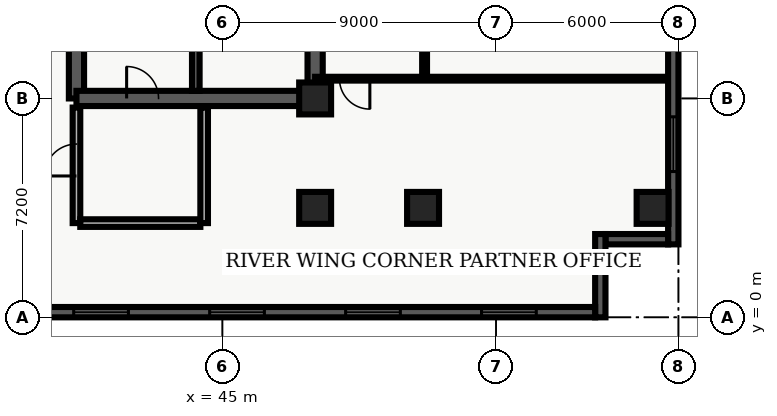
"""IFC4 building model, lengths in metres.
Left out: names, types, materials, properties, quantities, classifications, styles, units other than length and angle.
Written with IfcOpenShell. Run it as: python <this file> out.ifc"""

import sys

from ifc_helpers import new_model, entity, si_unit, converted_unit, direction, frame, origin_with_axes, origin_2d_with_axis, place, context, subcontext, project, spatial, polyline, rectangle, outline, extrude, element, fill, save


model = new_model("IFC4")
c1 = context("Model", 3, precision=1e-05, world=origin_with_axes(), true_north=direction((0.0, 1.0)))
c2 = subcontext(c1, "Body", "Model", "MODEL_VIEW")
j1 = project(units=[si_unit("LENGTHUNIT", "METRE"), converted_unit("PLANEANGLEUNIT", "DEGREE", entity("IfcPlaneAngleMeasure", 0.017), si_unit("PLANEANGLEUNIT", "RADIAN"), dimensions=[0, 0, 0, 0, 0, 0, 0])], contexts=[c1])
p1 = place(None, origin_with_axes())
s1 = spatial("IfcSite", under=j1, at=p1, CompositionType="ELEMENT")
p2 = place(p1, origin_with_axes())
s2 = spatial("IfcBuilding", under=s1, at=p2, CompositionType="ELEMENT")
p3 = place(p2, frame((0.0, 0.0, 148.5), z_axis=(0.0, 0.0, 1.0), x_axis=(1.0, 0.0, 0.0)))
s3 = spatial("IfcBuildingStorey", under=s2, at=p3, CompositionType="ELEMENT", Elevation=148.5)
p4 = place(p3, frame((40.2, 7.2, 0.0), z_axis=(0.0, 0.0, 1.0), x_axis=(0.0, 1.0, 0.0)))
e1 = element("IfcWall", 1, at=p4, inside=s3, PredefinedType="SHEAR", context=c2, shape_type="SweptSolid", body=[
    extrude(outline(polyline([(0.0, -0.25), (15.6, -0.25), (15.6, 0.25), (0.0, 0.25), (0.0, -0.25)])), origin_with_axes(), (0.0, 0.0, 1.0), 3.66),
])
p5 = place(p4, frame((14.475, 0.0, 0.0), z_axis=(0.0, 0.0, 1.0), x_axis=(1.0, 0.0, 0.0)))
e2 = element("IfcOpeningElement", 2, at=p5, cuts=e1, PredefinedType="OPENING", context=c2, shape_type="SweptSolid", body=[
    extrude(rectangle(XDim=1.05, YDim=0.52, at=origin_2d_with_axis()), origin_with_axes(), (0.0, 0.0, 1.0), 2.15),
])
p6 = place(p4, frame((12.75, 0.0, 0.0), z_axis=(0.0, 0.0, 1.0), x_axis=(1.0, 0.0, 0.0)))
e3 = element("IfcOpeningElement", 3, at=p6, cuts=e1, PredefinedType="OPENING", context=c2, shape_type="SweptSolid", body=[
    extrude(rectangle(XDim=1.2, YDim=0.52, at=origin_2d_with_axis()), origin_with_axes(), (0.0, 0.0, 1.0), 2.15),
])
p7 = place(p4, frame((9.3, 0.0, 0.0), z_axis=(0.0, 0.0, 1.0), x_axis=(1.0, 0.0, 0.0)))
e4 = element("IfcOpeningElement", 4, at=p7, cuts=e1, PredefinedType="OPENING", context=c2, shape_type="SweptSolid", body=[
    extrude(rectangle(XDim=0.9, YDim=0.52, at=origin_2d_with_axis()), origin_with_axes(), (0.0, 0.0, 1.0), 2.15),
])
p8 = place(p3, frame((40.2, 7.2, 0.0), z_axis=(0.0, 0.0, 1.0), x_axis=(1.0, 0.0, 0.0)))
e5 = element("IfcWall", 5, at=p8, inside=s3, PredefinedType="SHEAR", context=c2, shape_type="SweptSolid", body=[
    extrude(outline(polyline([(0.0, -0.25), (7.85, -0.25), (7.85, 0.25), (0.0, 0.25), (0.0, -0.25)])), origin_with_axes(), (0.0, 0.0, 1.0), 3.66),
])
p9 = place(p8, frame((2.175, 0.0, 0.0), z_axis=(0.0, 0.0, 1.0), x_axis=(1.0, 0.0, 0.0)))
e6 = element("IfcOpeningElement", 6, at=p9, cuts=e5, PredefinedType="OPENING", context=c2, shape_type="SweptSolid", body=[
    extrude(rectangle(XDim=1.05, YDim=0.52, at=origin_2d_with_axis()), origin_with_axes(), (0.0, 0.0, 1.0), 2.15),
])
p10 = place(p3, frame((48.05, 7.2, 0.0), z_axis=(0.0, 0.0, 1.0), x_axis=(0.0, 1.0, 0.0)))
e7 = element("IfcWall", 7, at=p10, inside=s3, PredefinedType="SHEAR", context=c2, shape_type="SweptSolid", body=[
    extrude(outline(polyline([(0.0, -0.25), (15.6, -0.25), (15.6, 0.25), (0.0, 0.25), (0.0, -0.25)])), origin_with_axes(), (0.0, 0.0, 1.0), 3.66),
])
p11 = place(p10, frame((5.975, 0.0, 0.0), z_axis=(0.0, 0.0, 1.0), x_axis=(1.0, 0.0, 0.0)))
e8 = element("IfcOpeningElement", 8, at=p11, cuts=e7, PredefinedType="OPENING", context=c2, shape_type="SweptSolid", body=[
    extrude(rectangle(XDim=1.05, YDim=0.52, at=origin_2d_with_axis()), origin_with_axes(), (0.0, 0.0, 1.0), 2.15),
])
p12 = place(p10, frame((2.725, 0.0, 0.0), z_axis=(0.0, 0.0, 1.0), x_axis=(1.0, 0.0, 0.0)))
e9 = element("IfcOpeningElement", 9, at=p12, cuts=e7, PredefinedType="OPENING", context=c2, shape_type="SweptSolid", body=[
    extrude(rectangle(XDim=0.95, YDim=0.52, at=origin_2d_with_axis()), origin_with_axes(), (0.0, 0.0, 1.0), 2.15),
])
p13 = place(p3, frame((44.125, 7.45, 0.0), z_axis=(0.0, 0.0, 1.0), x_axis=(0.0, 1.0, 0.0)))
e10 = element("IfcWall", 10, at=p13, inside=s3, PredefinedType="SHEAR", context=c2, shape_type="SweptSolid", body=[
    extrude(outline(polyline([(0.0, -0.125), (15.1, -0.125), (15.1, 0.125), (0.0, 0.125), (0.0, -0.125)])), origin_with_axes(), (0.0, 0.0, 1.0), 3.66),
])
p14 = place(p3, frame((40.2, 3.1, 0.0), z_axis=(0.0, 0.0, 1.0), x_axis=(0.0, 1.0, 0.0)))
e11 = element("IfcWall", 11, at=p14, inside=s3, PredefinedType="SOLIDWALL", context=c2, shape_type="SweptSolid", body=[
    extrude(outline(polyline([(0.0, -0.125), (3.8, -0.125), (3.8, 0.125), (0.0, 0.125), (0.0, -0.125)])), origin_with_axes(), (0.0, 0.0, 1.0), 2.7),
])
p15 = place(p14, frame((2.075, 0.0, 0.0), z_axis=(0.0, 0.0, 1.0), x_axis=(1.0, 0.0, 0.0)))
e12 = element("IfcOpeningElement", 12, at=p15, cuts=e11, PredefinedType="OPENING", context=c2, shape_type="SweptSolid", body=[
    extrude(rectangle(XDim=1.05, YDim=0.27, at=origin_2d_with_axis()), origin_with_axes(), (0.0, 0.0, 1.0), 2.15),
])
p16 = place(p3, frame((40.325, 3.1, 0.0), z_axis=(0.0, 0.0, 1.0), x_axis=(1.0, 0.0, 0.0)))
e13 = element("IfcWall", 13, at=p16, inside=s3, PredefinedType="SOLIDWALL", context=c2, shape_type="SweptSolid", body=[
    extrude(outline(polyline([(0.0, -0.125), (3.95, -0.125), (3.95, 0.125), (0.0, 0.125), (0.0, -0.125)])), origin_with_axes(), (0.0, 0.0, 1.0), 2.7),
])
p17 = place(p3, frame((44.4, 3.1, 0.0), z_axis=(0.0, 0.0, 1.0), x_axis=(0.0, 1.0, 0.0)))
e14 = element("IfcWall", 14, at=p17, inside=s3, PredefinedType="SOLIDWALL", context=c2, shape_type="SweptSolid", body=[
    extrude(outline(polyline([(0.0, -0.125), (3.8, -0.125), (3.8, 0.125), (0.0, 0.125), (0.0, -0.125)])), origin_with_axes(), (0.0, 0.0, 1.0), 2.7),
])
for number, where, z_axis, x_axis in (
    (15, (48.05, 3.6, 0.0), (0.0, 0.0, 1.0), (1.0, 0.0, 0.0)),
    (16, (48.05, 7.2, 0.0), (0.0, 0.0, 1.0), (1.0, 0.0, 0.0)),
    (17, (51.6, 3.6, 0.0), (0.0, 0.0, 1.0), (1.0, 0.0, 0.0)),
    (18, (59.15, 3.6, 0.0), (0.0, 0.0, 1.0), (1.0, 0.0, 0.0)),
):
    element("IfcColumn", number, at=place(p3, frame(where, z_axis=z_axis, x_axis=x_axis)), inside=s3, PredefinedType="COLUMN", context=c2, shape_type="SweptSolid", body=[
        extrude(rectangle(XDim=1.05, YDim=1.05, at=origin_2d_with_axis()), origin_with_axes(), (0.0, 0.0, 1.0), 3.9),
    ])
p18 = place(p3, frame((51.65, 7.85, 0.0), z_axis=(0.0, 0.0, 1.0), x_axis=(0.0, 1.0, 0.0)))
e19 = element("IfcWall", 19, at=p18, inside=s3, PredefinedType="PARTITIONING", context=c2, shape_type="SweptSolid", body=[
    extrude(outline(polyline([(0.0, -0.08), (18.8, -0.08), (18.8, 0.08), (0.0, 0.08), (0.0, -0.08)])), origin_with_axes(), (0.0, 0.0, 1.0), 2.7),
])
p19 = place(p18, frame((4.559, 0.0, 0.0), z_axis=(0.0, 0.0, 1.0), x_axis=(1.0, 0.0, 0.0)))
e20 = element("IfcOpeningElement", 20, at=p19, cuts=e19, PredefinedType="OPENING", context=c2, shape_type="SweptSolid", body=[
    extrude(rectangle(XDim=1.0, YDim=0.18, at=origin_2d_with_axis()), origin_with_axes(), (0.0, 0.0, 1.0), 2.15),
])
p20 = place(p18, frame((11.523, 0.0, 0.0), z_axis=(0.0, 0.0, 1.0), x_axis=(1.0, 0.0, 0.0)))
e21 = element("IfcOpeningElement", 21, at=p20, cuts=e19, PredefinedType="OPENING", context=c2, shape_type="SweptSolid", body=[
    extrude(rectangle(XDim=1.0, YDim=0.18, at=origin_2d_with_axis()), origin_with_axes(), (0.0, 0.0, 1.0), 2.15),
])
p21 = place(p18, frame((17.733, 0.0, 0.0), z_axis=(0.0, 0.0, 1.0), x_axis=(1.0, 0.0, 0.0)))
e22 = element("IfcOpeningElement", 22, at=p21, cuts=e19, PredefinedType="OPENING", context=c2, shape_type="SweptSolid", body=[
    extrude(rectangle(XDim=1.0, YDim=0.18, at=origin_2d_with_axis()), origin_with_axes(), (0.0, 0.0, 1.0), 2.15),
])
p22 = place(p3, frame((59.665, 7.85, 0.0), z_axis=(0.0, 0.0, 1.0), x_axis=(-1.0, 0.0, 0.0)))
e23 = element("IfcWall", 23, at=p22, inside=s3, PredefinedType="PARTITIONING", context=c2, shape_type="SweptSolid", body=[
    extrude(outline(polyline([(0.0, -0.062), (11.615, -0.062), (11.615, 0.062), (0.0, 0.062), (0.0, -0.062)])), origin_with_axes(), (0.0, 0.0, 1.0), 2.7),
])
p23 = place(p22, frame((10.315, 0.0, 0.0), z_axis=(0.0, 0.0, 1.0), x_axis=(1.0, 0.0, 0.0)))
e24 = element("IfcOpeningElement", 24, at=p23, cuts=e23, PredefinedType="OPENING", context=c2, shape_type="SweptSolid", body=[
    extrude(rectangle(XDim=1.0, YDim=0.145, at=origin_2d_with_axis()), origin_with_axes(), (0.0, 0.0, 1.0), 2.15),
])
p24 = place(p3, frame((59.83, 26.06, 0.0), z_axis=(0.0, 0.0, 1.0), x_axis=(0.0, -1.0, 0.0)))
e25 = element("IfcWall", 25, at=p24, inside=s3, PredefinedType="SOLIDWALL", context=c2, shape_type="SweptSolid", body=[
    extrude(outline(polyline([(0.0, -0.17), (23.66, -0.17), (23.66, 0.17), (0.0, 0.17), (0.0, -0.17)])), origin_with_axes(), (0.0, 0.0, 1.0), 3.66),
])
p25 = place(p24, frame((11.83, 0.0, 0.45), z_axis=(0.0, 0.0, 1.0), x_axis=(1.0, 0.0, 0.0)))
e26 = element("IfcOpeningElement", 26, at=p25, cuts=e25, PredefinedType="OPENING", context=c2, shape_type="SweptSolid", body=[
    extrude(rectangle(XDim=1.8, YDim=0.36, at=origin_2d_with_axis()), origin_with_axes(), (0.0, 0.0, 1.0), 2.1),
])
p26 = place(p24, frame((20.364, 0.0, 0.45), z_axis=(0.0, 0.0, 1.0), x_axis=(1.0, 0.0, 0.0)))
e27 = element("IfcOpeningElement", 27, at=p26, cuts=e25, PredefinedType="OPENING", context=c2, shape_type="SweptSolid", body=[
    extrude(rectangle(XDim=1.8, YDim=0.36, at=origin_2d_with_axis()), origin_with_axes(), (0.0, 0.0, 1.0), 2.1),
])
p27 = place(p3, frame((59.66, 2.57, 0.0), z_axis=(0.0, 0.0, 1.0), x_axis=(-1.0, 0.0, 0.0)))
e28 = element("IfcWall", 28, at=p27, inside=s3, PredefinedType="SOLIDWALL", context=c2, shape_type="SweptSolid", body=[
    extrude(outline(polyline([(0.0, -0.17), (2.06, -0.17), (2.06, 0.17), (0.0, 0.17), (0.0, -0.17)])), origin_with_axes(), (0.0, 0.0, 1.0), 3.66),
])
p28 = place(p3, frame((57.43, 2.74, 0.0), z_axis=(0.0, 0.0, 1.0), x_axis=(0.0, -1.0, 0.0)))
e29 = element("IfcWall", 29, at=p28, inside=s3, PredefinedType="SOLIDWALL", context=c2, shape_type="SweptSolid", body=[
    extrude(outline(polyline([(0.0, -0.17), (2.74, -0.17), (2.74, 0.17), (0.0, 0.17), (0.0, -0.17)])), origin_with_axes(), (0.0, 0.0, 1.0), 3.66),
])
p29 = place(p3, frame((57.26, 0.17, 0.0), z_axis=(0.0, 0.0, 1.0), x_axis=(-1.0, 0.0, 0.0)))
e30 = element("IfcWall", 30, at=p29, inside=s3, PredefinedType="SOLIDWALL", context=c2, shape_type="SweptSolid", body=[
    extrude(outline(polyline([(0.0, -0.17), (54.86, -0.17), (54.86, 0.17), (0.0, 0.17), (0.0, -0.17)])), origin_with_axes(), (0.0, 0.0, 1.0), 3.66),
])
p30 = place(p29, frame((2.836, 0.0, 0.45), z_axis=(0.0, 0.0, 1.0), x_axis=(1.0, 0.0, 0.0)))
e31 = element("IfcOpeningElement", 31, at=p30, cuts=e30, PredefinedType="OPENING", context=c2, shape_type="SweptSolid", body=[
    extrude(rectangle(XDim=1.8, YDim=0.36, at=origin_2d_with_axis()), origin_with_axes(), (0.0, 0.0, 1.0), 2.1),
])
p31 = place(p29, frame((7.307, 0.0, 0.45), z_axis=(0.0, 0.0, 1.0), x_axis=(1.0, 0.0, 0.0)))
e32 = element("IfcOpeningElement", 32, at=p31, cuts=e30, PredefinedType="OPENING", context=c2, shape_type="SweptSolid", body=[
    extrude(rectangle(XDim=1.8, YDim=0.36, at=origin_2d_with_axis()), origin_with_axes(), (0.0, 0.0, 1.0), 2.1),
])
p32 = place(p29, frame((11.779, 0.0, 0.45), z_axis=(0.0, 0.0, 1.0), x_axis=(1.0, 0.0, 0.0)))
e33 = element("IfcOpeningElement", 33, at=p32, cuts=e30, PredefinedType="OPENING", context=c2, shape_type="SweptSolid", body=[
    extrude(rectangle(XDim=1.8, YDim=0.36, at=origin_2d_with_axis()), origin_with_axes(), (0.0, 0.0, 1.0), 2.1),
])
p33 = place(p29, frame((16.251, 0.0, 0.45), z_axis=(0.0, 0.0, 1.0), x_axis=(1.0, 0.0, 0.0)))
e34 = element("IfcOpeningElement", 34, at=p33, cuts=e30, PredefinedType="OPENING", context=c2, shape_type="SweptSolid", body=[
    extrude(rectangle(XDim=1.8, YDim=0.36, at=origin_2d_with_axis()), origin_with_axes(), (0.0, 0.0, 1.0), 2.1),
])
p34 = place(p29, frame((20.723, 0.0, 0.45), z_axis=(0.0, 0.0, 1.0), x_axis=(1.0, 0.0, 0.0)))
e35 = element("IfcOpeningElement", 35, at=p34, cuts=e30, PredefinedType="OPENING", context=c2, shape_type="SweptSolid", body=[
    extrude(rectangle(XDim=1.8, YDim=0.36, at=origin_2d_with_axis()), origin_with_axes(), (0.0, 0.0, 1.0), 2.1),
])
p35 = place(p29, frame((25.194, 0.0, 0.45), z_axis=(0.0, 0.0, 1.0), x_axis=(1.0, 0.0, 0.0)))
e36 = element("IfcOpeningElement", 36, at=p35, cuts=e30, PredefinedType="OPENING", context=c2, shape_type="SweptSolid", body=[
    extrude(rectangle(XDim=1.8, YDim=0.36, at=origin_2d_with_axis()), origin_with_axes(), (0.0, 0.0, 1.0), 2.1),
])
p36 = place(p29, frame((29.666, 0.0, 0.45), z_axis=(0.0, 0.0, 1.0), x_axis=(1.0, 0.0, 0.0)))
e37 = element("IfcOpeningElement", 37, at=p36, cuts=e30, PredefinedType="OPENING", context=c2, shape_type="SweptSolid", body=[
    extrude(rectangle(XDim=1.8, YDim=0.36, at=origin_2d_with_axis()), origin_with_axes(), (0.0, 0.0, 1.0), 2.1),
])
p37 = place(p29, frame((34.138, 0.0, 0.45), z_axis=(0.0, 0.0, 1.0), x_axis=(1.0, 0.0, 0.0)))
e38 = element("IfcOpeningElement", 38, at=p37, cuts=e30, PredefinedType="OPENING", context=c2, shape_type="SweptSolid", body=[
    extrude(rectangle(XDim=1.8, YDim=0.36, at=origin_2d_with_axis()), origin_with_axes(), (0.0, 0.0, 1.0), 2.1),
])
p38 = place(p29, frame((38.609, 0.0, 0.45), z_axis=(0.0, 0.0, 1.0), x_axis=(1.0, 0.0, 0.0)))
e39 = element("IfcOpeningElement", 39, at=p38, cuts=e30, PredefinedType="OPENING", context=c2, shape_type="SweptSolid", body=[
    extrude(rectangle(XDim=1.8, YDim=0.36, at=origin_2d_with_axis()), origin_with_axes(), (0.0, 0.0, 1.0), 2.1),
])
p39 = place(p29, frame((43.081, 0.0, 0.45), z_axis=(0.0, 0.0, 1.0), x_axis=(1.0, 0.0, 0.0)))
e40 = element("IfcOpeningElement", 40, at=p39, cuts=e30, PredefinedType="OPENING", context=c2, shape_type="SweptSolid", body=[
    extrude(rectangle(XDim=1.8, YDim=0.36, at=origin_2d_with_axis()), origin_with_axes(), (0.0, 0.0, 1.0), 2.1),
])
p40 = place(p29, frame((48.403, 0.0, 0.45), z_axis=(0.0, 0.0, 1.0), x_axis=(1.0, 0.0, 0.0)))
e41 = element("IfcOpeningElement", 41, at=p40, cuts=e30, PredefinedType="OPENING", context=c2, shape_type="SweptSolid", body=[
    extrude(rectangle(XDim=1.8, YDim=0.36, at=origin_2d_with_axis()), origin_with_axes(), (0.0, 0.0, 1.0), 2.1),
])
p41 = place(p29, frame((52.024, 0.0, 0.45), z_axis=(0.0, 0.0, 1.0), x_axis=(1.0, 0.0, 0.0)))
e42 = element("IfcOpeningElement", 42, at=p41, cuts=e30, PredefinedType="OPENING", context=c2, shape_type="SweptSolid", body=[
    extrude(rectangle(XDim=1.8, YDim=0.36, at=origin_2d_with_axis()), origin_with_axes(), (0.0, 0.0, 1.0), 2.1),
])
p42 = place(p8, frame((2.175, 0.0, 0.0), z_axis=(0.0, 0.0, 1.0), x_axis=(1.0, 0.0, 0.0)))
e43 = element("IfcDoor", 43, at=p42, inside=s3, OperationType="SINGLE_SWING_LEFT", PredefinedType="DOOR", context=c2, shape_type="SweptSolid", body=[
    extrude(rectangle(XDim=1.05, YDim=0.09, at=origin_2d_with_axis()), origin_with_axes(), (0.0, 0.0, 1.0), 2.15),
])
fill(e6, e43)
p43 = place(p14, frame((2.075, 0.0, 0.0), z_axis=(0.0, 0.0, 1.0), x_axis=(1.0, 0.0, 0.0)))
e44 = element("IfcDoor", 44, at=p43, inside=s3, OperationType="SINGLE_SWING_LEFT", PredefinedType="DOOR", context=c2, shape_type="SweptSolid", body=[
    extrude(rectangle(XDim=1.05, YDim=0.09, at=origin_2d_with_axis()), origin_with_axes(), (0.0, 0.0, 1.0), 2.15),
])
fill(e12, e44)
p44 = place(p22, frame((10.315, 0.0, 0.0), z_axis=(0.0, 0.0, 1.0), x_axis=(1.0, 0.0, 0.0)))
e45 = element("IfcDoor", 45, at=p44, inside=s3, OperationType="SINGLE_SWING_LEFT", PredefinedType="DOOR", context=c2, shape_type="SweptSolid", body=[
    extrude(rectangle(XDim=1.0, YDim=0.075, at=origin_2d_with_axis()), origin_with_axes(), (0.0, 0.0, 1.0), 2.15),
])
fill(e24, e45)
p45 = place(p24, frame((20.364, 0.0, 0.45), z_axis=(0.0, 0.0, 1.0), x_axis=(1.0, 0.0, 0.0)))
e46 = element("IfcWindow", 46, at=p45, inside=s3, PredefinedType="WINDOW", context=c2, shape_type="SweptSolid", body=[
    extrude(rectangle(XDim=1.8, YDim=0.09, at=origin_2d_with_axis()), origin_with_axes(), (0.0, 0.0, 1.0), 2.1),
])
fill(e27, e46)
p46 = place(p29, frame((2.836, 0.0, 0.45), z_axis=(0.0, 0.0, 1.0), x_axis=(1.0, 0.0, 0.0)))
e47 = element("IfcWindow", 47, at=p46, inside=s3, PredefinedType="WINDOW", context=c2, shape_type="SweptSolid", body=[
    extrude(rectangle(XDim=1.8, YDim=0.09, at=origin_2d_with_axis()), origin_with_axes(), (0.0, 0.0, 1.0), 2.1),
])
fill(e31, e47)
p47 = place(p29, frame((7.307, 0.0, 0.45), z_axis=(0.0, 0.0, 1.0), x_axis=(1.0, 0.0, 0.0)))
e48 = element("IfcWindow", 48, at=p47, inside=s3, PredefinedType="WINDOW", context=c2, shape_type="SweptSolid", body=[
    extrude(rectangle(XDim=1.8, YDim=0.09, at=origin_2d_with_axis()), origin_with_axes(), (0.0, 0.0, 1.0), 2.1),
])
fill(e32, e48)
p48 = place(p29, frame((11.779, 0.0, 0.45), z_axis=(0.0, 0.0, 1.0), x_axis=(1.0, 0.0, 0.0)))
e49 = element("IfcWindow", 49, at=p48, inside=s3, PredefinedType="WINDOW", context=c2, shape_type="SweptSolid", body=[
    extrude(rectangle(XDim=1.8, YDim=0.09, at=origin_2d_with_axis()), origin_with_axes(), (0.0, 0.0, 1.0), 2.1),
])
fill(e33, e49)
p49 = place(p29, frame((16.251, 0.0, 0.45), z_axis=(0.0, 0.0, 1.0), x_axis=(1.0, 0.0, 0.0)))
e50 = element("IfcWindow", 50, at=p49, inside=s3, PredefinedType="WINDOW", context=c2, shape_type="SweptSolid", body=[
    extrude(rectangle(XDim=1.8, YDim=0.09, at=origin_2d_with_axis()), origin_with_axes(), (0.0, 0.0, 1.0), 2.1),
])
fill(e34, e50)
save(model, sys.argv[1])
